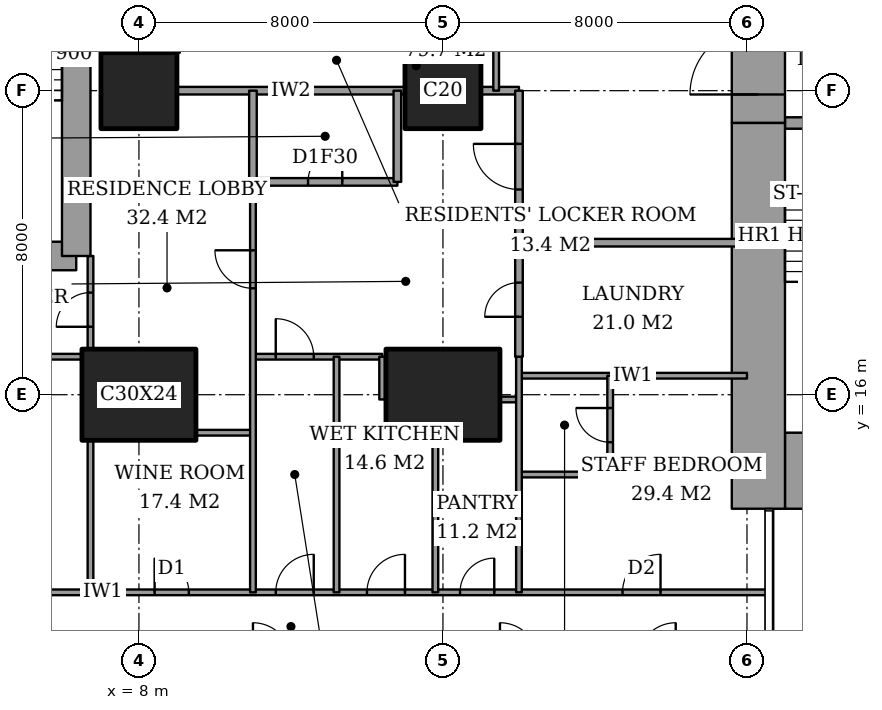
"""IFC4 building model, lengths in metres.
Left out: names, types, materials, properties, quantities, classifications, styles, units other than length and angle.
Written with IfcOpenShell. Run it as: python <this file> out.ifc"""

import sys

from ifc_helpers import new_model, si_unit, direction, frame, frame_2d, origin, origin_2d, place, context, subcontext, project, spatial, rectangle, extrude, element, fill, save


model = new_model("IFC4")
c1 = context("Model", 3, precision=1e-05, world=origin(), true_north=direction((0.0, 1.0)))
c2 = subcontext(c1, "Body", "Model", "MODEL_VIEW")
j1 = project(units=[si_unit("LENGTHUNIT", "METRE"), si_unit("PLANEANGLEUNIT", "RADIAN")], contexts=[c1])
p1 = place(None, origin())
s1 = spatial("IfcSite", under=j1, at=p1, CompositionType="ELEMENT")
p2 = place(p1, origin())
s2 = spatial("IfcBuilding", under=s1, at=p2, CompositionType="ELEMENT")
p3 = place(p2, frame((0.0, 0.0, 103.4)))
s3 = spatial("IfcBuildingStorey", under=s2, at=p3, CompositionType="ELEMENT", Elevation=103.4)
p4 = place(p3, frame((8.0, 16.0, 0.0), z_axis=(0.0, 0.0, 1.0), x_axis=(1.0, 0.0, 0.0)))
e1 = element("IfcColumn", 1, at=p4, inside=s3, PredefinedType="COLUMN", context=c2, shape_type="SweptSolid", body=[
    extrude(rectangle(XDim=3.0, YDim=2.4, at=origin_2d()), origin(), (0.0, 0.0, 1.0), 3.6),
])
p5 = place(p3, frame((8.0, 24.0, 0.0), z_axis=(0.0, 0.0, 1.0), x_axis=(1.0, 0.0, 0.0)))
e2 = element("IfcColumn", 2, at=p5, inside=s3, PredefinedType="COLUMN", context=c2, shape_type="SweptSolid", body=[
    extrude(rectangle(XDim=2.0, YDim=2.0, at=origin_2d()), origin(), (0.0, 0.0, 1.0), 3.6),
])
p6 = place(p3, frame((16.0, 16.0, 0.0), z_axis=(0.0, 0.0, 1.0), x_axis=(1.0, 0.0, 0.0)))
e3 = element("IfcColumn", 3, at=p6, inside=s3, PredefinedType="COLUMN", context=c2, shape_type="SweptSolid", body=[
    extrude(rectangle(XDim=3.0, YDim=2.4, at=origin_2d()), origin(), (0.0, 0.0, 1.0), 3.6),
])
p7 = place(p3, frame((16.0, 24.0, 0.0), z_axis=(0.0, 0.0, 1.0), x_axis=(1.0, 0.0, 0.0)))
e4 = element("IfcColumn", 4, at=p7, inside=s3, PredefinedType="COLUMN", context=c2, shape_type="SweptSolid", body=[
    extrude(rectangle(XDim=2.0, YDim=2.0, at=origin_2d()), origin(), (0.0, 0.0, 1.0), 3.6),
])
p8 = place(p3, frame((25.0, 14.0, 0.0), z_axis=(0.0, 0.0, 1.0), x_axis=(1.0, 0.0, 0.0)))
e5 = element("IfcWall", 5, at=p8, inside=s3, PredefinedType="SHEAR", context=c2, shape_type="SweptSolid", body=[
    extrude(rectangle(XDim=3.15, YDim=2.0, at=frame_2d((1.575, 0.0))), origin(), (0.0, 0.0, 1.0), 3.6),
])
p9 = place(p3, frame((24.3, 13.0, 0.0), z_axis=(0.0, 0.0, 1.0), x_axis=(0.0, 1.0, 0.0)))
e6 = element("IfcWall", 6, at=p9, inside=s3, PredefinedType="SHEAR", context=c2, shape_type="SweptSolid", body=[
    extrude(rectangle(XDim=10.15, YDim=1.4, at=frame_2d((5.075, 0.0))), origin(), (0.0, 0.0, 1.0), 3.6),
])
p10 = place(p3, frame((24.3, 23.15, 0.0), z_axis=(0.0, 0.0, 1.0), x_axis=(0.0, 1.0, 0.0)))
e7 = element("IfcWall", 7, at=p10, inside=s3, PredefinedType="SHEAR", context=c2, shape_type="SweptSolid", body=[
    extrude(rectangle(XDim=11.85, YDim=1.4, at=frame_2d((5.925, 0.0))), origin(), (0.0, 0.0, 1.0), 3.6),
])
p11 = place(p10, frame((0.75, 0.0, 0.0)))
e8 = element("IfcOpeningElement", 8, at=p11, cuts=e7, PredefinedType="OPENING", context=c2, shape_type="SweptSolid", body=[
    extrude(rectangle(XDim=1.8, YDim=2.4, at=frame_2d((0.9, 1.2))), frame((0.0, 0.71, 0.0), z_axis=(0.0, -1.0, 0.0), x_axis=(1.0, 0.0, 0.0)), (0.0, 0.0, 1.0), 1.42),
])
p12 = place(p3, frame((25.0, 23.15, 0.0), z_axis=(0.0, 0.0, 1.0), x_axis=(1.0, 0.0, 0.0)))
e9 = element("IfcWall", 9, at=p12, inside=s3, PredefinedType="SHEAR", context=c2, shape_type="SweptSolid", body=[
    extrude(rectangle(XDim=3.15, YDim=0.3, at=frame_2d((1.575, 0.0))), origin(), (0.0, 0.0, 1.0), 3.6),
])
p13 = place(p12, frame((0.6, 0.0, 0.0)))
e10 = element("IfcOpeningElement", 10, at=p13, cuts=e9, PredefinedType="OPENING", context=c2, shape_type="SweptSolid", body=[
    extrude(rectangle(XDim=1.0, YDim=2.1, at=frame_2d((0.5, 1.05))), frame((0.0, 0.16, 0.0), z_axis=(0.0, -1.0, 0.0), x_axis=(1.0, 0.0, 0.0)), (0.0, 0.0, 1.0), 0.32),
])
p14 = place(p3, frame((1.9, 19.65, 0.0), z_axis=(0.0, 0.0, 1.0), x_axis=(1.0, 0.0, 0.0)))
e11 = element("IfcWall", 11, at=p14, inside=s3, PredefinedType="SHEAR", context=c2, shape_type="SweptSolid", body=[
    extrude(rectangle(XDim=4.45, YDim=0.75, at=frame_2d((2.225, 0.0))), origin(), (0.0, 0.0, 1.0), 3.6),
])
p15 = place(p3, frame((6.35, 19.65, 0.0), z_axis=(0.0, 0.0, 1.0), x_axis=(0.0, 1.0, 0.0)))
e12 = element("IfcWall", 12, at=p15, inside=s3, PredefinedType="SHEAR", context=c2, shape_type="SweptSolid", body=[
    extrude(rectangle(XDim=8.7, YDim=0.75, at=frame_2d((4.35, 0.0))), origin(), (0.0, 0.0, 1.0), 3.6),
])
p16 = place(p15, frame((6.725, 0.0, 0.0)))
e13 = element("IfcOpeningElement", 13, at=p16, cuts=e12, PredefinedType="OPENING", context=c2, shape_type="SweptSolid", body=[
    extrude(rectangle(XDim=1.0, YDim=2.1, at=frame_2d((0.5, 1.05))), frame((0.0, 0.385, 0.0), z_axis=(0.0, -1.0, 0.0), x_axis=(1.0, 0.0, 0.0)), (0.0, 0.0, 1.0), 0.77),
])
p17 = place(p3, frame((-0.45, 10.8, 0.0), z_axis=(0.0, 0.0, 1.0), x_axis=(1.0, 0.0, 0.0)))
e14 = element("IfcWall", 14, at=p17, inside=s3, PredefinedType="PARTITIONING", context=c2, shape_type="SweptSolid", body=[
    extrude(rectangle(XDim=25.011, YDim=0.15, at=frame_2d((12.505, 0.0))), origin(), (0.0, 0.0, 1.0), 3.35),
])
p18 = place(p17, frame((12.05, 0.0, 0.0)))
e15 = element("IfcOpeningElement", 15, at=p18, cuts=e14, PredefinedType="OPENING", context=c2, shape_type="SweptSolid", body=[
    extrude(rectangle(XDim=1.0, YDim=2.1, at=frame_2d((0.5, 1.05))), frame((0.0, 0.085, 0.0), z_axis=(0.0, -1.0, 0.0), x_axis=(1.0, 0.0, 0.0)), (0.0, 0.0, 1.0), 0.17),
])
p19 = place(p17, frame((3.087, 0.0, 0.0)))
e16 = element("IfcOpeningElement", 16, at=p19, cuts=e14, PredefinedType="OPENING", context=c2, shape_type="SweptSolid", body=[
    extrude(rectangle(XDim=1.0, YDim=2.1, at=frame_2d((0.5, 1.05))), frame((0.0, 0.085, 0.0), z_axis=(0.0, -1.0, 0.0), x_axis=(1.0, 0.0, 0.0)), (0.0, 0.0, 1.0), 0.17),
])
p20 = place(p17, frame((8.863, 0.0, 0.0)))
e17 = element("IfcOpeningElement", 17, at=p20, cuts=e14, PredefinedType="OPENING", context=c2, shape_type="SweptSolid", body=[
    extrude(rectangle(XDim=0.9, YDim=2.1, at=frame_2d((0.45, 1.05))), frame((0.0, 0.085, 0.0), z_axis=(0.0, -1.0, 0.0), x_axis=(1.0, 0.0, 0.0)), (0.0, 0.0, 1.0), 0.17),
])
p21 = place(p17, frame((14.45, 0.0, 0.0)))
e18 = element("IfcOpeningElement", 18, at=p21, cuts=e14, PredefinedType="OPENING", context=c2, shape_type="SweptSolid", body=[
    extrude(rectangle(XDim=1.0, YDim=2.1, at=frame_2d((0.5, 1.05))), frame((0.0, 0.085, 0.0), z_axis=(0.0, -1.0, 0.0), x_axis=(1.0, 0.0, 0.0)), (0.0, 0.0, 1.0), 0.17),
])
p22 = place(p17, frame((16.9, 0.0, 0.0)))
e19 = element("IfcOpeningElement", 19, at=p22, cuts=e14, PredefinedType="OPENING", context=c2, shape_type="SweptSolid", body=[
    extrude(rectangle(XDim=0.9, YDim=2.1, at=frame_2d((0.45, 1.05))), frame((0.0, 0.085, 0.0), z_axis=(0.0, -1.0, 0.0), x_axis=(1.0, 0.0, 0.0)), (0.0, 0.0, 1.0), 0.17),
])
p23 = place(p17, frame((21.175, 0.0, 0.0)))
e20 = element("IfcOpeningElement", 20, at=p23, cuts=e14, PredefinedType="OPENING", context=c2, shape_type="SweptSolid", body=[
    extrude(rectangle(XDim=1.0, YDim=2.1, at=frame_2d((0.5, 1.05))), frame((0.0, 0.085, 0.0), z_axis=(0.0, -1.0, 0.0), x_axis=(1.0, 0.0, 0.0)), (0.0, 0.0, 1.0), 0.17),
])
p24 = place(p3, frame((18.0, 13.9, 0.0), z_axis=(0.0, 0.0, 1.0), x_axis=(1.0, 0.0, 0.0)))
e21 = element("IfcWall", 21, at=p24, inside=s3, PredefinedType="PARTITIONING", context=c2, shape_type="SweptSolid", body=[
    extrude(rectangle(XDim=2.4, YDim=0.15, at=frame_2d((1.2, 0.0))), origin(), (0.0, 0.0, 1.0), 3.35),
])
p25 = place(p3, frame((9.5, 15.0, 0.0), z_axis=(0.0, 0.0, 1.0), x_axis=(1.0, 0.0, 0.0)))
e22 = element("IfcWall", 22, at=p25, inside=s3, PredefinedType="PARTITIONING", context=c2, shape_type="SweptSolid", body=[
    extrude(rectangle(XDim=1.5, YDim=0.15, at=frame_2d((0.75, 0.0))), origin(), (0.0, 0.0, 1.0), 3.35),
])
p26 = place(p3, frame((17.5, 15.875, 0.0), z_axis=(0.0, 0.0, 1.0), x_axis=(1.0, 0.0, 0.0)))
e23 = element("IfcWall", 23, at=p26, inside=s3, PredefinedType="PARTITIONING", context=c2, shape_type="SweptSolid", body=[
    extrude(rectangle(XDim=0.5, YDim=0.15, at=frame_2d((0.25, 0.0))), origin(), (0.0, 0.0, 1.0), 2.634),
])
p27 = place(p3, frame((18.0, 16.5, 0.0), z_axis=(0.0, 0.0, 1.0), x_axis=(1.0, 0.0, 0.0)))
e24 = element("IfcWall", 24, at=p27, inside=s3, PredefinedType="PARTITIONING", context=c2, shape_type="SweptSolid", body=[
    extrude(rectangle(XDim=6.0, YDim=0.15, at=frame_2d((3.0, 0.0))), origin(), (0.0, 0.0, 1.0), 3.35),
])
p28 = place(p3, frame((1.35, 17.0, 0.0), z_axis=(0.0, 0.0, 1.0), x_axis=(1.0, 0.0, 0.0)))
e25 = element("IfcWall", 25, at=p28, inside=s3, PredefinedType="PARTITIONING", context=c2, shape_type="SweptSolid", body=[
    extrude(rectangle(XDim=5.15, YDim=0.15, at=frame_2d((2.575, 0.0))), origin(), (0.0, 0.0, 1.0), 3.35),
])
p29 = place(p3, frame((11.0, 17.0, 0.0), z_axis=(0.0, 0.0, 1.0), x_axis=(1.0, 0.0, 0.0)))
e26 = element("IfcWall", 26, at=p29, inside=s3, PredefinedType="PARTITIONING", context=c2, shape_type="SweptSolid", body=[
    extrude(rectangle(XDim=3.4, YDim=0.15, at=frame_2d((1.7, 0.0))), origin(), (0.0, 0.0, 1.0), 3.35),
])
p30 = place(p29, frame((0.6, 0.0, 0.0)))
e27 = element("IfcOpeningElement", 27, at=p30, cuts=e26, PredefinedType="OPENING", context=c2, shape_type="SweptSolid", body=[
    extrude(rectangle(XDim=1.0, YDim=2.1, at=frame_2d((0.5, 1.05))), frame((0.0, 0.085, 0.0), z_axis=(0.0, -1.0, 0.0), x_axis=(1.0, 0.0, 0.0)), (0.0, 0.0, 1.0), 0.17),
])
p31 = place(p3, frame((18.0, 20.0, 0.0), z_axis=(0.0, 0.0, 1.0), x_axis=(1.0, 0.0, 0.0)))
e28 = element("IfcWall", 28, at=p31, inside=s3, PredefinedType="PARTITIONING", context=c2, shape_type="SweptSolid", body=[
    extrude(rectangle(XDim=6.0, YDim=0.2, at=frame_2d((3.0, 0.0))), origin(), (0.0, 0.0, 1.0), 3.35),
])
p32 = place(p3, frame((11.0, 21.6, 0.0), z_axis=(0.0, 0.0, 1.0), x_axis=(1.0, 0.0, 0.0)))
e29 = element("IfcWall", 29, at=p32, inside=s3, PredefinedType="PARTITIONING", context=c2, shape_type="SweptSolid", body=[
    extrude(rectangle(XDim=3.8, YDim=0.2, at=frame_2d((1.9, 0.0))), origin(), (0.0, 0.0, 1.0), 3.35),
])
p33 = place(p32, frame((1.45, 0.0, 0.0)))
e30 = element("IfcOpeningElement", 30, at=p33, cuts=e29, PredefinedType="OPENING", context=c2, shape_type="SweptSolid", body=[
    extrude(rectangle(XDim=0.9, YDim=2.1, at=frame_2d((0.45, 1.05))), frame((0.0, 0.11, 0.0), z_axis=(0.0, -1.0, 0.0), x_axis=(1.0, 0.0, 0.0)), (0.0, 0.0, 1.0), 0.22),
])
p34 = place(p3, frame((9.0, 24.0, 0.0), z_axis=(0.0, 0.0, 1.0), x_axis=(1.0, 0.0, 0.0)))
e31 = element("IfcWall", 31, at=p34, inside=s3, PredefinedType="PARTITIONING", context=c2, shape_type="SweptSolid", body=[
    extrude(rectangle(XDim=6.0, YDim=0.2, at=frame_2d((3.0, 0.0))), origin(), (0.0, 0.0, 1.0), 3.35),
])
p35 = place(p3, frame((17.0, 24.0, 0.0), z_axis=(0.0, 0.0, 1.0), x_axis=(1.0, 0.0, 0.0)))
e32 = element("IfcWall", 32, at=p35, inside=s3, PredefinedType="PARTITIONING", context=c2, shape_type="SweptSolid", body=[
    extrude(rectangle(XDim=1.0, YDim=0.2, at=frame_2d((0.5, 0.0))), origin(), (0.0, 0.0, 1.0), 3.35),
])
p36 = place(p3, frame((6.725, 10.8, 0.0), z_axis=(0.0, 0.0, 1.0), x_axis=(0.0, 1.0, 0.0)))
e33 = element("IfcWall", 33, at=p36, inside=s3, PredefinedType="PARTITIONING", context=c2, shape_type="SweptSolid", body=[
    extrude(rectangle(XDim=4.0, YDim=0.15, at=frame_2d((2.0, 0.0))), origin(), (0.0, 0.0, 1.0), 3.35),
])
p37 = place(p3, frame((6.725, 17.2, 0.0), z_axis=(0.0, 0.0, 1.0), x_axis=(0.0, 1.0, 0.0)))
e34 = element("IfcWall", 34, at=p37, inside=s3, PredefinedType="PARTITIONING", context=c2, shape_type="SweptSolid", body=[
    extrude(rectangle(XDim=2.45, YDim=0.15, at=frame_2d((1.225, 0.0))), origin(), (0.0, 0.0, 1.0), 3.35),
])
p38 = place(p37, frame((0.587, 0.0, 0.0)))
e35 = element("IfcOpeningElement", 35, at=p38, cuts=e34, PredefinedType="OPENING", context=c2, shape_type="SweptSolid", body=[
    extrude(rectangle(XDim=0.9, YDim=2.1, at=frame_2d((0.45, 1.05))), frame((0.0, 0.085, 0.0), z_axis=(0.0, -1.0, 0.0), x_axis=(1.0, 0.0, 0.0)), (0.0, 0.0, 1.0), 0.17),
])
p39 = place(p3, frame((11.0, 21.6, 0.0), z_axis=(0.0, 0.0, 1.0), x_axis=(0.0, 1.0, 0.0)))
e36 = element("IfcWall", 36, at=p39, inside=s3, PredefinedType="PARTITIONING", context=c2, shape_type="SweptSolid", body=[
    extrude(rectangle(XDim=2.4, YDim=0.2, at=frame_2d((1.2, 0.0))), origin(), (0.0, 0.0, 1.0), 3.35),
])
p40 = place(p3, frame((11.0, 10.8, 0.0), z_axis=(0.0, 0.0, 1.0), x_axis=(0.0, 1.0, 0.0)))
e37 = element("IfcWall", 37, at=p40, inside=s3, PredefinedType="PARTITIONING", context=c2, shape_type="SweptSolid", body=[
    extrude(rectangle(XDim=10.8, YDim=0.15, at=frame_2d((5.4, 0.0))), origin(), (0.0, 0.0, 1.0), 3.35),
])
p41 = place(p40, frame((8.0, 0.0, 0.0)))
e38 = element("IfcOpeningElement", 38, at=p41, cuts=e37, PredefinedType="OPENING", context=c2, shape_type="SweptSolid", body=[
    extrude(rectangle(XDim=1.0, YDim=2.1, at=frame_2d((0.5, 1.05))), frame((0.0, 0.085, 0.0), z_axis=(0.0, -1.0, 0.0), x_axis=(1.0, 0.0, 0.0)), (0.0, 0.0, 1.0), 0.17),
])
p42 = place(p3, frame((13.2, 10.8, 0.0), z_axis=(0.0, 0.0, 1.0), x_axis=(0.0, 1.0, 0.0)))
e39 = element("IfcWall", 39, at=p42, inside=s3, PredefinedType="PARTITIONING", context=c2, shape_type="SweptSolid", body=[
    extrude(rectangle(XDim=6.2, YDim=0.15, at=frame_2d((3.1, 0.0))), origin(), (0.0, 0.0, 1.0), 3.35),
])
p43 = place(p3, frame((14.4, 15.875, 0.0), z_axis=(0.0, 0.0, 1.0), x_axis=(0.0, 1.0, 0.0)))
e40 = element("IfcWall", 40, at=p43, inside=s3, PredefinedType="PARTITIONING", context=c2, shape_type="SweptSolid", body=[
    extrude(rectangle(XDim=1.125, YDim=0.15, at=frame_2d((0.562, 0.0))), origin(), (0.0, 0.0, 1.0), 3.35),
])
p44 = place(p3, frame((14.8, 21.6, 0.0), z_axis=(0.0, 0.0, 1.0), x_axis=(0.0, 1.0, 0.0)))
e41 = element("IfcWall", 41, at=p44, inside=s3, PredefinedType="PARTITIONING", context=c2, shape_type="SweptSolid", body=[
    extrude(rectangle(XDim=2.4, YDim=0.2, at=frame_2d((1.2, 0.0))), origin(), (0.0, 0.0, 1.0), 3.35),
])
p45 = place(p3, frame((15.8, 10.8, 0.0), z_axis=(0.0, 0.0, 1.0), x_axis=(0.0, 1.0, 0.0)))
e42 = element("IfcWall", 42, at=p45, inside=s3, PredefinedType="PARTITIONING", context=c2, shape_type="SweptSolid", body=[
    extrude(rectangle(XDim=4.0, YDim=0.15, at=frame_2d((2.0, 0.0))), origin(), (0.0, 0.0, 1.0), 3.35),
])
p46 = place(p3, frame((17.4, 24.0, 0.0), z_axis=(0.0, 0.0, 1.0), x_axis=(0.0, 1.0, 0.0)))
e43 = element("IfcWall", 43, at=p46, inside=s3, PredefinedType="PARTITIONING", context=c2, shape_type="SweptSolid", body=[
    extrude(rectangle(XDim=1.6, YDim=0.15, at=frame_2d((0.8, 0.0))), origin(), (0.0, 0.0, 1.0), 3.35),
])
p47 = place(p3, frame((18.0, 17.0, 0.0), z_axis=(0.0, 0.0, 1.0), x_axis=(0.0, 1.0, 0.0)))
e44 = element("IfcWall", 44, at=p47, inside=s3, PredefinedType="PARTITIONING", context=c2, shape_type="SweptSolid", body=[
    extrude(rectangle(XDim=7.0, YDim=0.2, at=frame_2d((3.5, 0.0))), origin(), (0.0, 0.0, 1.0), 3.35),
])
p48 = place(p47, frame((4.4, 0.0, 0.0)))
e45 = element("IfcOpeningElement", 45, at=p48, cuts=e44, PredefinedType="OPENING", context=c2, shape_type="SweptSolid", body=[
    extrude(rectangle(XDim=1.2, YDim=2.4, at=frame_2d((0.6, 1.2))), frame((0.0, 0.11, 0.0), z_axis=(0.0, -1.0, 0.0), x_axis=(1.0, 0.0, 0.0)), (0.0, 0.0, 1.0), 0.22),
])
p49 = place(p47, frame((1.05, 0.0, 0.0)))
e46 = element("IfcOpeningElement", 46, at=p49, cuts=e44, PredefinedType="OPENING", context=c2, shape_type="SweptSolid", body=[
    extrude(rectangle(XDim=0.9, YDim=2.1, at=frame_2d((0.45, 1.05))), frame((0.0, 0.11, 0.0), z_axis=(0.0, -1.0, 0.0), x_axis=(1.0, 0.0, 0.0)), (0.0, 0.0, 1.0), 0.22),
])
p50 = place(p3, frame((18.0, 10.8, 0.0), z_axis=(0.0, 0.0, 1.0), x_axis=(0.0, 1.0, 0.0)))
e47 = element("IfcWall", 47, at=p50, inside=s3, PredefinedType="PARTITIONING", context=c2, shape_type="SweptSolid", body=[
    extrude(rectangle(XDim=6.2, YDim=0.15, at=frame_2d((3.1, 0.0))), origin(), (0.0, 0.0, 1.0), 3.35),
])
p51 = place(p3, frame((20.4, 13.9, 0.0), z_axis=(0.0, 0.0, 1.0), x_axis=(0.0, 1.0, 0.0)))
e48 = element("IfcWall", 48, at=p51, inside=s3, PredefinedType="PARTITIONING", context=c2, shape_type="SweptSolid", body=[
    extrude(rectangle(XDim=2.6, YDim=0.15, at=frame_2d((1.3, 0.0))), origin(), (0.0, 0.0, 1.0), 3.35),
])
p52 = place(p51, frame((0.85, 0.0, 0.0)))
e49 = element("IfcOpeningElement", 49, at=p52, cuts=e48, PredefinedType="OPENING", context=c2, shape_type="SweptSolid", body=[
    extrude(rectangle(XDim=0.9, YDim=2.1, at=frame_2d((0.45, 1.05))), frame((0.0, 0.085, 0.0), z_axis=(0.0, -1.0, 0.0), x_axis=(1.0, 0.0, 0.0)), (0.0, 0.0, 1.0), 0.17),
])
p53 = place(p18, origin())
e50 = element("IfcDoor", 50, at=p53, inside=s3, OperationType="SINGLE_SWING_LEFT", PredefinedType="DOOR", context=c2, shape_type="SweptSolid", body=[
    extrude(rectangle(XDim=1.0, YDim=2.1, at=frame_2d((0.5, 1.05))), frame((0.0, 0.025, 0.0), z_axis=(0.0, -1.0, 0.0), x_axis=(1.0, 0.0, 0.0)), (0.0, 0.0, 1.0), 0.05),
])
fill(e15, e50)
p54 = place(p38, origin())
e51 = element("IfcDoor", 51, at=p54, inside=s3, OperationType="SINGLE_SWING_RIGHT", PredefinedType="DOOR", context=c2, shape_type="SweptSolid", body=[
    extrude(rectangle(XDim=0.9, YDim=2.1, at=frame_2d((0.45, 1.05))), frame((0.0, 0.025, 0.0), z_axis=(0.0, -1.0, 0.0), x_axis=(1.0, 0.0, 0.0)), (0.0, 0.0, 1.0), 0.05),
])
fill(e35, e51)
p55 = place(p20, origin())
e52 = element("IfcDoor", 52, at=p55, inside=s3, OperationType="SINGLE_SWING_RIGHT", PredefinedType="DOOR", context=c2, shape_type="SweptSolid", body=[
    extrude(rectangle(XDim=0.9, YDim=2.1, at=frame_2d((0.45, 1.05))), frame((0.0, 0.025, 0.0), z_axis=(0.0, -1.0, 0.0), x_axis=(1.0, 0.0, 0.0)), (0.0, 0.0, 1.0), 0.05),
])
fill(e17, e52)
p56 = place(p41, origin())
e53 = element("IfcDoor", 53, at=p56, inside=s3, OperationType="SINGLE_SWING_LEFT", PredefinedType="DOOR", context=c2, shape_type="SweptSolid", body=[
    extrude(rectangle(XDim=1.0, YDim=2.1, at=frame_2d((0.5, 1.05))), frame((0.0, 0.025, 0.0), z_axis=(0.0, -1.0, 0.0), x_axis=(1.0, 0.0, 0.0)), (0.0, 0.0, 1.0), 0.05),
])
fill(e38, e53)
p57 = place(p33, origin())
e54 = element("IfcDoor", 54, at=p57, inside=s3, OperationType="SINGLE_SWING_LEFT", PredefinedType="DOOR", context=c2, shape_type="SweptSolid", body=[
    extrude(rectangle(XDim=0.9, YDim=2.1, at=frame_2d((0.45, 1.05))), frame((0.0, 0.025, 0.0), z_axis=(0.0, -1.0, 0.0), x_axis=(1.0, 0.0, 0.0)), (0.0, 0.0, 1.0), 0.05),
])
fill(e30, e54)
p58 = place(p48, origin())
e55 = element("IfcDoor", 55, at=p58, inside=s3, OperationType="SINGLE_SWING_LEFT", PredefinedType="DOOR", context=c2, shape_type="SweptSolid", body=[
    extrude(rectangle(XDim=1.2, YDim=2.4, at=frame_2d((0.6, 1.2))), frame((0.0, 0.025, 0.0), z_axis=(0.0, -1.0, 0.0), x_axis=(1.0, 0.0, 0.0)), (0.0, 0.0, 1.0), 0.05),
])
fill(e45, e55)
p59 = place(p30, origin())
e56 = element("IfcDoor", 56, at=p59, inside=s3, OperationType="SINGLE_SWING_RIGHT", PredefinedType="DOOR", context=c2, shape_type="SweptSolid", body=[
    extrude(rectangle(XDim=1.0, YDim=2.1, at=frame_2d((0.5, 1.05))), frame((0.0, 0.025, 0.0), z_axis=(0.0, -1.0, 0.0), x_axis=(1.0, 0.0, 0.0)), (0.0, 0.0, 1.0), 0.05),
])
fill(e27, e56)
p60 = place(p21, origin())
e57 = element("IfcDoor", 57, at=p60, inside=s3, OperationType="SINGLE_SWING_LEFT", PredefinedType="DOOR", context=c2, shape_type="SweptSolid", body=[
    extrude(rectangle(XDim=1.0, YDim=2.1, at=frame_2d((0.5, 1.05))), frame((0.0, 0.025, 0.0), z_axis=(0.0, -1.0, 0.0), x_axis=(1.0, 0.0, 0.0)), (0.0, 0.0, 1.0), 0.05),
])
fill(e18, e57)
p61 = place(p22, origin())
e58 = element("IfcDoor", 58, at=p61, inside=s3, OperationType="SINGLE_SWING_LEFT", PredefinedType="DOOR", context=c2, shape_type="SweptSolid", body=[
    extrude(rectangle(XDim=0.9, YDim=2.1, at=frame_2d((0.45, 1.05))), frame((0.0, 0.025, 0.0), z_axis=(0.0, -1.0, 0.0), x_axis=(1.0, 0.0, 0.0)), (0.0, 0.0, 1.0), 0.05),
])
fill(e19, e58)
p62 = place(p52, origin())
e59 = element("IfcDoor", 59, at=p62, inside=s3, OperationType="SINGLE_SWING_LEFT", PredefinedType="DOOR", context=c2, shape_type="SweptSolid", body=[
    extrude(rectangle(XDim=0.9, YDim=2.1, at=frame_2d((0.45, 1.05))), frame((0.0, 0.025, 0.0), z_axis=(0.0, -1.0, 0.0), x_axis=(1.0, 0.0, 0.0)), (0.0, 0.0, 1.0), 0.05),
])
fill(e49, e59)
p63 = place(p23, origin())
e60 = element("IfcDoor", 60, at=p63, inside=s3, OperationType="SINGLE_SWING_LEFT", PredefinedType="DOOR", context=c2, shape_type="SweptSolid", body=[
    extrude(rectangle(XDim=1.0, YDim=2.1, at=frame_2d((0.5, 1.05))), frame((0.0, 0.025, 0.0), z_axis=(0.0, -1.0, 0.0), x_axis=(1.0, 0.0, 0.0)), (0.0, 0.0, 1.0), 0.05),
])
fill(e20, e60)
p64 = place(p49, origin())
e61 = element("IfcDoor", 61, at=p64, inside=s3, OperationType="SINGLE_SWING_RIGHT", PredefinedType="DOOR", context=c2, shape_type="SweptSolid", body=[
    extrude(rectangle(XDim=0.9, YDim=2.1, at=frame_2d((0.45, 1.05))), frame((0.0, 0.025, 0.0), z_axis=(0.0, -1.0, 0.0), x_axis=(1.0, 0.0, 0.0)), (0.0, 0.0, 1.0), 0.05),
])
fill(e46, e61)
p65 = place(p11, origin())
e62 = element("IfcDoor", 62, at=p65, inside=s3, OperationType="DOUBLE_DOOR_DOUBLE_SWING", PredefinedType="DOOR", context=c2, shape_type="SweptSolid", body=[
    extrude(rectangle(XDim=1.8, YDim=2.4, at=frame_2d((0.9, 1.2))), frame((0.0, 0.025, 0.0), z_axis=(0.0, -1.0, 0.0), x_axis=(1.0, 0.0, 0.0)), (0.0, 0.0, 1.0), 0.05),
])
fill(e8, e62)
save(model, sys.argv[1])
